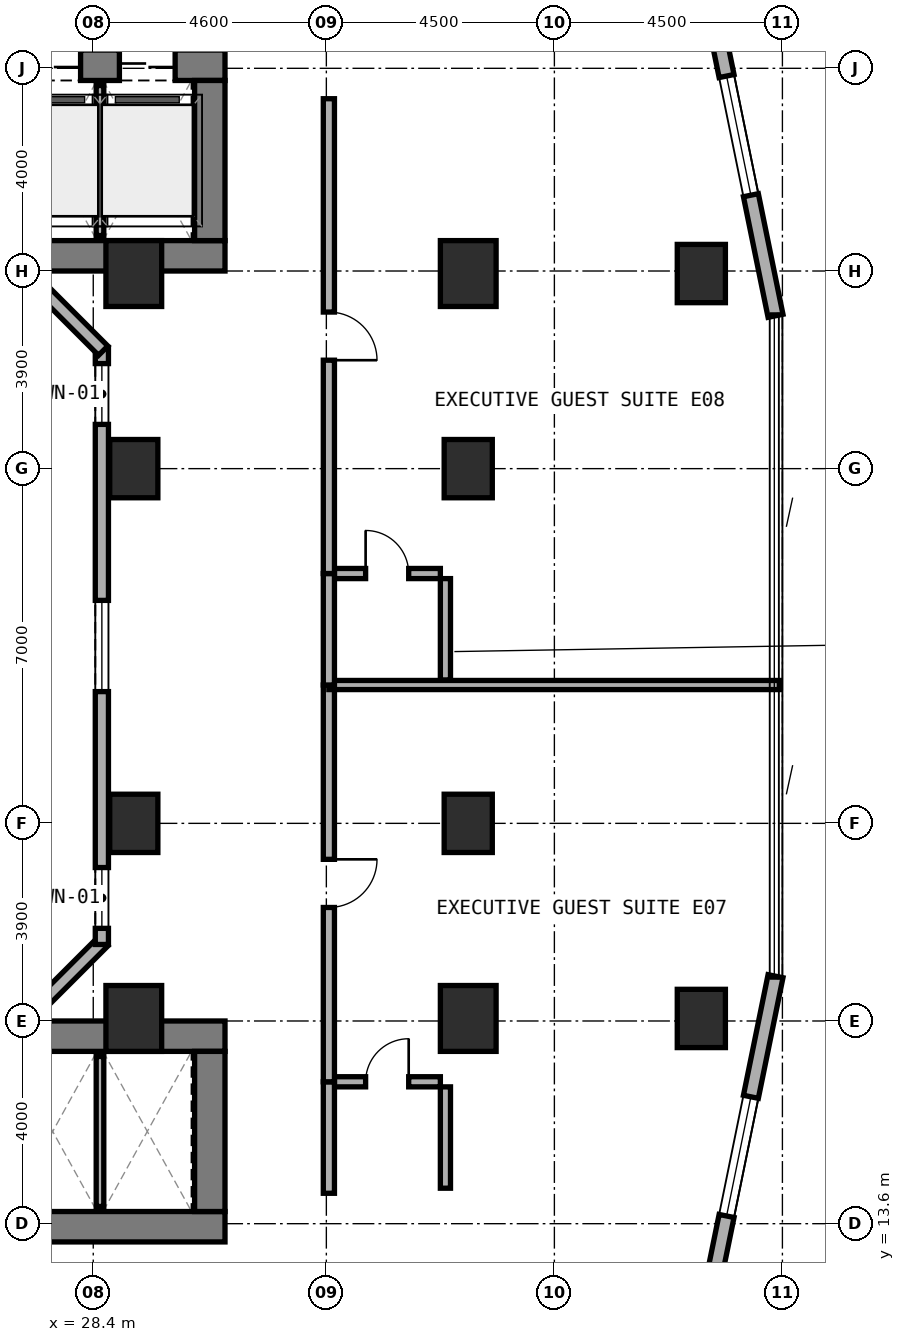
"""IFC4 building model, lengths in metres.
Left out: names, types, materials, properties, quantities, classifications, styles, units other than length and angle.
Written with IfcOpenShell. Run it as: python <this file> out.ifc"""

import sys

from ifc_helpers import new_model, si_unit, direction, frame, frame_2d, origin, origin_2d, place, context, subcontext, project, spatial, rectangle, extrude, element, fill, save


model = new_model("IFC4")
c1 = context("Model", 3, precision=1e-05, world=origin(), true_north=direction((0.0, 1.0)))
c2 = subcontext(c1, "Body", "Model", "MODEL_VIEW")
j1 = project(units=[si_unit("LENGTHUNIT", "METRE"), si_unit("PLANEANGLEUNIT", "RADIAN")], contexts=[c1])
p1 = place(None, origin())
s1 = spatial("IfcSite", under=j1, at=p1, CompositionType="ELEMENT")
p2 = place(p1, origin())
s2 = spatial("IfcBuilding", under=s1, at=p2, CompositionType="ELEMENT")
p3 = place(p2, frame((0.0, 0.0, 45.0)))
s3 = spatial("IfcBuildingStorey", under=s2, at=p3, CompositionType="ELEMENT", Elevation=45.0)
p4 = place(p3, frame((6.2, 32.7, 0.0), z_axis=(0.0, 0.0, 1.0), x_axis=(1.0, 0.0, 0.0)))
e1 = element("IfcWall", 1, at=p4, inside=s3, PredefinedType="SHEAR", context=c2, shape_type="SweptSolid", body=[
    extrude(rectangle(XDim=24.8, YDim=0.6, at=frame_2d((12.4, 0.0))), origin(), (0.0, 0.0, 1.0), 3.5),
])
p5 = place(p4, frame((6.25, 0.0, 0.0)))
e2 = element("IfcOpeningElement", 2, at=p5, cuts=e1, PredefinedType="OPENING", context=c2, shape_type="SweptSolid", body=[
    extrude(rectangle(XDim=1.1, YDim=2.15, at=frame_2d((0.55, 1.075))), frame((0.0, 0.31, 0.0), z_axis=(0.0, -1.0, 0.0), x_axis=(1.0, 0.0, 0.0)), (0.0, 0.0, 1.0), 0.62),
])
p6 = place(p3, frame((6.2, 36.46, 0.0), z_axis=(0.0, 0.0, 1.0), x_axis=(1.0, 0.0, 0.0)))
e3 = element("IfcWall", 3, at=p6, inside=s3, PredefinedType="SHEAR", context=c2, shape_type="SweptSolid", body=[
    extrude(rectangle(XDim=24.8, YDim=0.6, at=frame_2d((12.4, 0.0))), origin(), (0.0, 0.0, 1.0), 3.5),
])
p7 = place(p6, frame((9.35, 0.0, 0.0)))
e4 = element("IfcOpeningElement", 4, at=p7, cuts=e3, PredefinedType="OPENING", context=c2, shape_type="SweptSolid", body=[
    extrude(rectangle(XDim=1.2, YDim=2.15, at=frame_2d((0.6, 1.075))), frame((0.0, 0.31, 0.0), z_axis=(0.0, -1.0, 0.0), x_axis=(1.0, 0.0, 0.0)), (0.0, 0.0, 1.0), 0.62),
])
p8 = place(p6, frame((17.14, 0.0, 0.0)))
e5 = element("IfcOpeningElement", 5, at=p8, cuts=e3, PredefinedType="OPENING", context=c2, shape_type="SweptSolid", body=[
    extrude(rectangle(XDim=0.85, YDim=2.1, at=frame_2d((0.425, 1.05))), frame((0.0, 0.31, 0.0), z_axis=(0.0, -1.0, 0.0), x_axis=(1.0, 0.0, 0.0)), (0.0, 0.0, 1.0), 0.62),
])
p9 = place(p6, frame((18.983, 0.0, 0.0)))
e6 = element("IfcOpeningElement", 6, at=p9, cuts=e3, PredefinedType="OPENING", context=c2, shape_type="SweptSolid", body=[
    extrude(rectangle(XDim=1.1, YDim=2.15, at=frame_2d((0.55, 1.075))), frame((0.0, 0.31, 0.0), z_axis=(0.0, -1.0, 0.0), x_axis=(1.0, 0.0, 0.0)), (0.0, 0.0, 1.0), 0.62),
])
p10 = place(p6, frame((20.85, 0.0, 0.0)))
e7 = element("IfcOpeningElement", 7, at=p10, cuts=e3, PredefinedType="OPENING", context=c2, shape_type="SweptSolid", body=[
    extrude(rectangle(XDim=1.1, YDim=2.15, at=frame_2d((0.55, 1.075))), frame((0.0, 0.31, 0.0), z_axis=(0.0, -1.0, 0.0), x_axis=(1.0, 0.0, 0.0)), (0.0, 0.0, 1.0), 0.62),
])
p11 = place(p6, frame((22.716, 0.0, 0.0)))
e8 = element("IfcOpeningElement", 8, at=p11, cuts=e3, PredefinedType="OPENING", context=c2, shape_type="SweptSolid", body=[
    extrude(rectangle(XDim=1.1, YDim=2.15, at=frame_2d((0.55, 1.075))), frame((0.0, 0.31, 0.0), z_axis=(0.0, -1.0, 0.0), x_axis=(1.0, 0.0, 0.0)), (0.0, 0.0, 1.0), 0.62),
])
p12 = place(p3, frame((30.7, 33.0, 0.0), z_axis=(0.0, 0.0, 1.0), x_axis=(0.0, 1.0, 0.0)))
e9 = element("IfcWall", 9, at=p12, inside=s3, PredefinedType="SHEAR", context=c2, shape_type="SweptSolid", body=[
    extrude(rectangle(XDim=3.16, YDim=0.6, at=frame_2d((1.58, 0.0))), origin(), (0.0, 0.0, 1.0), 3.5),
])
p13 = place(p3, frame((6.2, 13.54, 0.0), z_axis=(0.0, 0.0, 1.0), x_axis=(1.0, 0.0, 0.0)))
e10 = element("IfcWall", 10, at=p13, inside=s3, PredefinedType="SHEAR", context=c2, shape_type="SweptSolid", body=[
    extrude(rectangle(XDim=24.8, YDim=0.6, at=frame_2d((12.4, 0.0))), origin(), (0.0, 0.0, 1.0), 3.5),
])
p14 = place(p13, frame((9.35, 0.0, 0.0)))
e11 = element("IfcOpeningElement", 11, at=p14, cuts=e10, PredefinedType="OPENING", context=c2, shape_type="SweptSolid", body=[
    extrude(rectangle(XDim=1.2, YDim=2.15, at=frame_2d((0.6, 1.075))), frame((0.0, 0.31, 0.0), z_axis=(0.0, -1.0, 0.0), x_axis=(1.0, 0.0, 0.0)), (0.0, 0.0, 1.0), 0.62),
])
p15 = place(p13, frame((17.14, 0.0, 0.0)))
e12 = element("IfcOpeningElement", 12, at=p15, cuts=e10, PredefinedType="OPENING", context=c2, shape_type="SweptSolid", body=[
    extrude(rectangle(XDim=0.85, YDim=2.1, at=frame_2d((0.425, 1.05))), frame((0.0, 0.31, 0.0), z_axis=(0.0, -1.0, 0.0), x_axis=(1.0, 0.0, 0.0)), (0.0, 0.0, 1.0), 0.62),
])
p16 = place(p3, frame((6.2, 17.3, 0.0), z_axis=(0.0, 0.0, 1.0), x_axis=(1.0, 0.0, 0.0)))
e13 = element("IfcWall", 13, at=p16, inside=s3, PredefinedType="SHEAR", context=c2, shape_type="SweptSolid", body=[
    extrude(rectangle(XDim=24.8, YDim=0.6, at=frame_2d((12.4, 0.0))), origin(), (0.0, 0.0, 1.0), 3.5),
])
p17 = place(p3, frame((30.7, 13.84, 0.0), z_axis=(0.0, 0.0, 1.0), x_axis=(0.0, 1.0, 0.0)))
e14 = element("IfcWall", 14, at=p17, inside=s3, PredefinedType="SHEAR", context=c2, shape_type="SweptSolid", body=[
    extrude(rectangle(XDim=3.16, YDim=0.6, at=frame_2d((1.58, 0.0))), origin(), (0.0, 0.0, 1.0), 3.5),
])
for number, where, z_axis, x_axis in (
    (15, (35.8, 21.5, 0.0), (0.0, 0.0, 1.0), (1.0, 0.0, 0.0)),
    (16, (35.8, 28.5, 0.0), (0.0, 0.0, 1.0), (1.0, 0.0, 0.0)),
):
    element("IfcColumn", number, at=place(p3, frame(where, z_axis=z_axis, x_axis=x_axis)), inside=s3, PredefinedType="COLUMN", context=c2, shape_type="SweptSolid", body=[
        extrude(rectangle(XDim=0.95, YDim=1.15, at=origin_2d()), origin(), (0.0, 0.0, 1.0), 3.5),
    ])
for number, where, z_axis, x_axis in (
    (17, (35.8, 17.65, 0.0), (0.0, 0.0, 1.0), (1.0, 0.0, 0.0)),
    (18, (35.8, 32.35, 0.0), (0.0, 0.0, 1.0), (1.0, 0.0, 0.0)),
    (19, (29.2, 17.65, 0.0), (0.0, 0.0, 1.0), (1.0, 0.0, 0.0)),
    (20, (29.2, 32.35, 0.0), (0.0, 0.0, 1.0), (1.0, 0.0, 0.0)),
):
    element("IfcColumn", number, at=place(p3, frame(where, z_axis=z_axis, x_axis=x_axis)), inside=s3, PredefinedType="COLUMN", context=c2, shape_type="SweptSolid", body=[
        extrude(rectangle(XDim=1.1, YDim=1.3, at=origin_2d()), origin(), (0.0, 0.0, 1.0), 3.5),
    ])
for number, where, z_axis, x_axis in (
    (21, (29.2, 21.5, 0.0), (0.0, 0.0, 1.0), (1.0, 0.0, 0.0)),
    (22, (29.2, 28.5, 0.0), (0.0, 0.0, 1.0), (1.0, 0.0, 0.0)),
    (23, (40.4, 17.65, 0.0), (0.0, 0.0, 1.0), (1.0, 0.0, 0.0)),
    (24, (40.4, 32.35, 0.0), (0.0, 0.0, 1.0), (1.0, 0.0, 0.0)),
):
    element("IfcColumn", number, at=place(p3, frame(where, z_axis=z_axis, x_axis=x_axis)), inside=s3, PredefinedType="COLUMN", context=c2, shape_type="SweptSolid", body=[
        extrude(rectangle(XDim=0.95, YDim=1.15, at=origin_2d()), origin(), (0.0, 0.0, 1.0), 3.5),
    ])
p18 = place(p3, frame((39.851, 8.622, 0.0), z_axis=(0.0, 0.0, 1.0), x_axis=(0.199990901713, 0.979797754249, 0.0)))
e25 = element("IfcWall", 25, at=p18, inside=s3, PredefinedType="STANDARD", context=c2, shape_type="SweptSolid", body=[
    extrude(rectangle(XDim=10.065, YDim=0.3, at=frame_2d((5.033, 0.0))), origin(), (0.0, 0.0, 1.0), 3.22),
])
p19 = place(p18, frame((0.378, 0.0, 0.85)))
e26 = element("IfcOpeningElement", 26, at=p19, cuts=e25, PredefinedType="OPENING", context=c2, shape_type="SweptSolid", body=[
    extrude(rectangle(XDim=1.8, YDim=1.5, at=frame_2d((0.9, 0.75))), frame((0.0, 0.16, 0.0), z_axis=(0.0, -1.0, 0.0), x_axis=(1.0, 0.0, 0.0)), (0.0, 0.0, 1.0), 0.32),
])
p20 = place(p18, frame((5.236, 0.0, 0.8)))
e27 = element("IfcOpeningElement", 27, at=p20, cuts=e25, PredefinedType="OPENING", context=c2, shape_type="SweptSolid", body=[
    extrude(rectangle(XDim=2.4, YDim=1.6, at=frame_2d((1.2, 0.8))), frame((0.0, 0.16, 0.0), z_axis=(0.0, -1.0, 0.0), x_axis=(1.0, 0.0, 0.0)), (0.0, 0.0, 1.0), 0.32),
])
p21 = place(p3, frame((41.864, 31.516, 0.0), z_axis=(0.0, 0.0, 1.0), x_axis=(-0.199990901713, 0.979797754249, 0.0)))
e28 = element("IfcWall", 28, at=p21, inside=s3, PredefinedType="STANDARD", context=c2, shape_type="SweptSolid", body=[
    extrude(rectangle(XDim=10.065, YDim=0.3, at=frame_2d((5.033, 0.0))), origin(), (0.0, 0.0, 1.0), 3.22),
])
p22 = place(p21, frame((2.429, 0.0, 0.8)))
e29 = element("IfcOpeningElement", 29, at=p22, cuts=e28, PredefinedType="OPENING", context=c2, shape_type="SweptSolid", body=[
    extrude(rectangle(XDim=2.4, YDim=1.6, at=frame_2d((1.2, 0.8))), frame((0.0, 0.16, 0.0), z_axis=(0.0, -1.0, 0.0), x_axis=(1.0, 0.0, 0.0)), (0.0, 0.0, 1.0), 0.32),
])
p23 = place(p21, frame((7.887, 0.0, 0.85)))
e30 = element("IfcOpeningElement", 30, at=p23, cuts=e28, PredefinedType="OPENING", context=c2, shape_type="SweptSolid", body=[
    extrude(rectangle(XDim=1.8, YDim=1.5, at=frame_2d((0.9, 0.75))), frame((0.0, 0.16, 0.0), z_axis=(0.0, -1.0, 0.0), x_axis=(1.0, 0.0, 0.0)), (0.0, 0.0, 1.0), 0.32),
])
p24 = place(p3, frame((26.762, 17.338, 0.0), z_axis=(0.0, 0.0, 1.0), x_axis=(0.707059717605, 0.707153841636, 0.0)))
e31 = element("IfcWall", 31, at=p24, inside=s3, PredefinedType="STANDARD", context=c2, shape_type="SweptSolid", body=[
    extrude(rectangle(XDim=2.594, YDim=0.26, at=frame_2d((1.297, 0.0))), origin(), (0.0, 0.0, 1.0), 3.22),
])
p25 = place(p3, frame((28.57, 19.11, 0.0), z_axis=(0.0, 0.0, 1.0), x_axis=(0.0, 1.0, 0.0)))
e32 = element("IfcWall", 32, at=p25, inside=s3, PredefinedType="STANDARD", context=c2, shape_type="SweptSolid", body=[
    extrude(rectangle(XDim=11.78, YDim=0.26, at=frame_2d((5.89, 0.0))), origin(), (0.0, 0.0, 1.0), 3.22),
])
p26 = place(p25, frame((0.318, 0.0, 0.85)))
e33 = element("IfcOpeningElement", 33, at=p26, cuts=e32, PredefinedType="OPENING", context=c2, shape_type="SweptSolid", body=[
    extrude(rectangle(XDim=1.2, YDim=1.5, at=frame_2d((0.6, 0.75))), frame((0.0, 0.14, 0.0), z_axis=(0.0, -1.0, 0.0), x_axis=(1.0, 0.0, 0.0)), (0.0, 0.0, 1.0), 0.28),
])
p27 = place(p25, frame((4.99, 0.0, 0.85)))
e34 = element("IfcOpeningElement", 34, at=p27, cuts=e32, PredefinedType="OPENING", context=c2, shape_type="SweptSolid", body=[
    extrude(rectangle(XDim=1.8, YDim=1.5, at=frame_2d((0.9, 0.75))), frame((0.0, 0.14, 0.0), z_axis=(0.0, -1.0, 0.0), x_axis=(1.0, 0.0, 0.0)), (0.0, 0.0, 1.0), 0.28),
])
p28 = place(p25, frame((10.263, 0.0, 0.85)))
e35 = element("IfcOpeningElement", 35, at=p28, cuts=e32, PredefinedType="OPENING", context=c2, shape_type="SweptSolid", body=[
    extrude(rectangle(XDim=1.2, YDim=1.5, at=frame_2d((0.6, 0.75))), frame((0.0, 0.14, 0.0), z_axis=(0.0, -1.0, 0.0), x_axis=(1.0, 0.0, 0.0)), (0.0, 0.0, 1.0), 0.28),
])
p29 = place(p3, frame((28.596, 30.828, 0.0), z_axis=(0.0, 0.0, 1.0), x_axis=(-0.707059717605, 0.707153841636, 0.0)))
e36 = element("IfcWall", 36, at=p29, inside=s3, PredefinedType="STANDARD", context=c2, shape_type="SweptSolid", body=[
    extrude(rectangle(XDim=2.594, YDim=0.26, at=frame_2d((1.297, 0.0))), origin(), (0.0, 0.0, 1.0), 3.22),
])
for number, where, z_axis, x_axis in (
    (37, (28.533, 33.1, 0.0), (0.0, 0.0, 1.0), (0.0, 1.0, 0.0)),
    (38, (28.533, 13.94, 0.0), (0.0, 0.0, 1.0), (0.0, 1.0, 0.0)),
):
    element("IfcWall", number, at=place(p3, frame(where, z_axis=z_axis, x_axis=x_axis)), inside=s3, PredefinedType="PARTITIONING", context=c2, shape_type="SweptSolid", body=[
        extrude(rectangle(XDim=2.96, YDim=0.15, at=frame_2d((1.48, 0.0))), origin(), (0.0, 0.0, 1.0), 2.395),
    ])
p30 = place(p3, frame((33.15, 16.4, 0.0), z_axis=(0.0, 0.0, 1.0), x_axis=(1.0, 0.0, 0.0)))
e39 = element("IfcWall", 39, at=p30, inside=s3, PredefinedType="PLUMBINGWALL", context=c2, shape_type="SweptSolid", body=[
    extrude(rectangle(XDim=2.1, YDim=0.2, at=frame_2d((1.05, 0.0))), origin(), (0.0, 0.0, 1.0), 3.22),
])
p31 = place(p30, frame((0.625, 0.0, 0.0)))
e40 = element("IfcOpeningElement", 40, at=p31, cuts=e39, PredefinedType="OPENING", context=c2, shape_type="SweptSolid", body=[
    extrude(rectangle(XDim=0.85, YDim=2.1, at=frame_2d((0.425, 1.05))), frame((0.0, 0.11, 0.0), z_axis=(0.0, -1.0, 0.0), x_axis=(1.0, 0.0, 0.0)), (0.0, 0.0, 1.0), 0.22),
])
p32 = place(p3, frame((35.35, 14.3, 0.0), z_axis=(0.0, 0.0, 1.0), x_axis=(0.0, 1.0, 0.0)))
e41 = element("IfcWall", 41, at=p32, inside=s3, PredefinedType="PLUMBINGWALL", context=c2, shape_type="SweptSolid", body=[
    extrude(rectangle(XDim=2.0, YDim=0.2, at=frame_2d((1.0, 0.0))), origin(), (0.0, 0.0, 1.0), 2.745),
])
p33 = place(p3, frame((33.05, 14.2, 0.0), z_axis=(0.0, 0.0, 1.0), x_axis=(0.0, 1.0, 0.0)))
e42 = element("IfcWall", 42, at=p33, inside=s3, PredefinedType="SOLIDWALL", context=c2, shape_type="SweptSolid", body=[
    extrude(rectangle(XDim=2.2, YDim=0.22, at=frame_2d((1.1, 0.0))), origin(), (0.0, 0.0, 1.0), 3.22),
])
p34 = place(p3, frame((33.05, 16.4, 0.0), z_axis=(0.0, 0.0, 1.0), x_axis=(0.0, 1.0, 0.0)))
e43 = element("IfcWall", 43, at=p34, inside=s3, PredefinedType="SOLIDWALL", context=c2, shape_type="SweptSolid", body=[
    extrude(rectangle(XDim=7.83, YDim=0.22, at=frame_2d((3.915, 0.0))), origin(), (0.0, 0.0, 1.0), 2.395),
])
p35 = place(p34, frame((3.44, 0.0, 0.0)))
e44 = element("IfcOpeningElement", 44, at=p35, cuts=e43, PredefinedType="OPENING", context=c2, shape_type="SweptSolid", body=[
    extrude(rectangle(XDim=0.95, YDim=2.1, at=frame_2d((0.475, 1.05))), frame((0.0, 0.12, 0.0), z_axis=(0.0, -1.0, 0.0), x_axis=(1.0, 0.0, 0.0)), (0.0, 0.0, 1.0), 0.24),
])
p36 = place(p3, frame((33.05, 24.23, 0.0), z_axis=(0.0, 0.0, 1.0), x_axis=(1.0, 0.0, 0.0)))
e45 = element("IfcWall", 45, at=p36, inside=s3, PredefinedType="SOLIDWALL", context=c2, shape_type="SweptSolid", body=[
    extrude(rectangle(XDim=8.89, YDim=0.18, at=frame_2d((4.445, 0.0))), origin(), (0.0, 0.0, 1.0), 2.745),
])
p37 = place(p3, frame((33.15, 26.43, 0.0), z_axis=(0.0, 0.0, 1.0), x_axis=(1.0, 0.0, 0.0)))
e46 = element("IfcWall", 46, at=p37, inside=s3, PredefinedType="PLUMBINGWALL", context=c2, shape_type="SweptSolid", body=[
    extrude(rectangle(XDim=2.1, YDim=0.2, at=frame_2d((1.05, 0.0))), origin(), (0.0, 0.0, 1.0), 3.22),
])
p38 = place(p37, frame((0.625, 0.0, 0.0)))
e47 = element("IfcOpeningElement", 47, at=p38, cuts=e46, PredefinedType="OPENING", context=c2, shape_type="SweptSolid", body=[
    extrude(rectangle(XDim=0.85, YDim=2.1, at=frame_2d((0.425, 1.05))), frame((0.0, 0.11, 0.0), z_axis=(0.0, -1.0, 0.0), x_axis=(1.0, 0.0, 0.0)), (0.0, 0.0, 1.0), 0.22),
])
p39 = place(p3, frame((35.35, 24.33, 0.0), z_axis=(0.0, 0.0, 1.0), x_axis=(0.0, 1.0, 0.0)))
e48 = element("IfcWall", 48, at=p39, inside=s3, PredefinedType="PLUMBINGWALL", context=c2, shape_type="SweptSolid", body=[
    extrude(rectangle(XDim=2.0, YDim=0.2, at=frame_2d((1.0, 0.0))), origin(), (0.0, 0.0, 1.0), 3.22),
])
p40 = place(p3, frame((33.05, 24.23, 0.0), z_axis=(0.0, 0.0, 1.0), x_axis=(0.0, 1.0, 0.0)))
e49 = element("IfcWall", 49, at=p40, inside=s3, PredefinedType="SOLIDWALL", context=c2, shape_type="SweptSolid", body=[
    extrude(rectangle(XDim=2.2, YDim=0.22, at=frame_2d((1.1, 0.0))), origin(), (0.0, 0.0, 1.0), 3.22),
])
p41 = place(p3, frame((33.05, 26.43, 0.0), z_axis=(0.0, 0.0, 1.0), x_axis=(0.0, 1.0, 0.0)))
e50 = element("IfcWall", 50, at=p41, inside=s3, PredefinedType="SOLIDWALL", context=c2, shape_type="SweptSolid", body=[
    extrude(rectangle(XDim=9.37, YDim=0.22, at=frame_2d((4.685, 0.0))), origin(), (0.0, 0.0, 1.0), 2.395),
])
p42 = place(p41, frame((4.21, 0.0, 0.0)))
e51 = element("IfcOpeningElement", 51, at=p42, cuts=e50, PredefinedType="OPENING", context=c2, shape_type="SweptSolid", body=[
    extrude(rectangle(XDim=0.95, YDim=2.1, at=frame_2d((0.475, 1.05))), frame((0.0, 0.12, 0.0), z_axis=(0.0, -1.0, 0.0), x_axis=(1.0, 0.0, 0.0)), (0.0, 0.0, 1.0), 0.24),
])
p43 = place(p20, origin())
e52 = element("IfcWindow", 52, at=p43, inside=s3, PartitioningType="SINGLE_PANEL", PredefinedType="WINDOW", context=c2, shape_type="SweptSolid", body=[
    extrude(rectangle(XDim=2.4, YDim=1.6, at=frame_2d((1.2, 0.8))), frame((0.0, 0.03, 0.0), z_axis=(0.0, -1.0, 0.0), x_axis=(1.0, 0.0, 0.0)), (0.0, 0.0, 1.0), 0.06),
])
fill(e27, e52)
p44 = place(p22, origin())
e53 = element("IfcWindow", 53, at=p44, inside=s3, PartitioningType="SINGLE_PANEL", PredefinedType="WINDOW", context=c2, shape_type="SweptSolid", body=[
    extrude(rectangle(XDim=2.4, YDim=1.6, at=frame_2d((1.2, 0.8))), frame((0.0, 0.03, 0.0), z_axis=(0.0, -1.0, 0.0), x_axis=(1.0, 0.0, 0.0)), (0.0, 0.0, 1.0), 0.06),
])
fill(e29, e53)
p45 = place(p26, origin())
e54 = element("IfcWindow", 54, at=p45, inside=s3, PartitioningType="SINGLE_PANEL", PredefinedType="WINDOW", context=c2, shape_type="SweptSolid", body=[
    extrude(rectangle(XDim=1.2, YDim=1.5, at=frame_2d((0.6, 0.75))), frame((0.0, 0.03, 0.0), z_axis=(0.0, -1.0, 0.0), x_axis=(1.0, 0.0, 0.0)), (0.0, 0.0, 1.0), 0.06),
])
fill(e33, e54)
p46 = place(p27, origin())
e55 = element("IfcWindow", 55, at=p46, inside=s3, PartitioningType="SINGLE_PANEL", PredefinedType="WINDOW", context=c2, shape_type="SweptSolid", body=[
    extrude(rectangle(XDim=1.8, YDim=1.5, at=frame_2d((0.9, 0.75))), frame((0.0, 0.03, 0.0), z_axis=(0.0, -1.0, 0.0), x_axis=(1.0, 0.0, 0.0)), (0.0, 0.0, 1.0), 0.06),
])
fill(e34, e55)
p47 = place(p28, origin())
e56 = element("IfcWindow", 56, at=p47, inside=s3, PartitioningType="SINGLE_PANEL", PredefinedType="WINDOW", context=c2, shape_type="SweptSolid", body=[
    extrude(rectangle(XDim=1.2, YDim=1.5, at=frame_2d((0.6, 0.75))), frame((0.0, 0.03, 0.0), z_axis=(0.0, -1.0, 0.0), x_axis=(1.0, 0.0, 0.0)), (0.0, 0.0, 1.0), 0.06),
])
fill(e35, e56)
p48 = place(p10, origin())
e57 = element("IfcDoor", 57, at=p48, inside=s3, OperationType="DOUBLE_DOOR_SLIDING", PredefinedType="DOOR", context=c2, shape_type="SweptSolid", body=[
    extrude(rectangle(XDim=1.1, YDim=2.15, at=frame_2d((0.55, 1.075))), frame((0.0, 0.025, 0.0), z_axis=(0.0, -1.0, 0.0), x_axis=(1.0, 0.0, 0.0)), (0.0, 0.0, 1.0), 0.05),
])
fill(e7, e57)
p49 = place(p11, origin())
e58 = element("IfcDoor", 58, at=p49, inside=s3, OperationType="DOUBLE_DOOR_SLIDING", PredefinedType="DOOR", context=c2, shape_type="SweptSolid", body=[
    extrude(rectangle(XDim=1.1, YDim=2.15, at=frame_2d((0.55, 1.075))), frame((0.0, 0.025, 0.0), z_axis=(0.0, -1.0, 0.0), x_axis=(1.0, 0.0, 0.0)), (0.0, 0.0, 1.0), 0.05),
])
fill(e8, e58)
p50 = place(p31, origin())
e59 = element("IfcDoor", 59, at=p50, inside=s3, OperationType="SINGLE_SWING_RIGHT", PredefinedType="DOOR", context=c2, shape_type="SweptSolid", body=[
    extrude(rectangle(XDim=0.85, YDim=2.1, at=frame_2d((0.425, 1.05))), frame((0.0, 0.025, 0.0), z_axis=(0.0, -1.0, 0.0), x_axis=(1.0, 0.0, 0.0)), (0.0, 0.0, 1.0), 0.05),
])
fill(e40, e59)
p51 = place(p35, frame((0.95, 0.0, 0.0), z_axis=(0.0, 0.0, 1.0), x_axis=(-1.0, 0.0, 0.0)))
e60 = element("IfcDoor", 60, at=p51, inside=s3, OperationType="SINGLE_SWING_LEFT", PredefinedType="DOOR", context=c2, shape_type="SweptSolid", body=[
    extrude(rectangle(XDim=0.95, YDim=2.1, at=frame_2d((0.475, 1.05))), frame((0.0, 0.025, 0.0), z_axis=(0.0, -1.0, 0.0), x_axis=(1.0, 0.0, 0.0)), (0.0, 0.0, 1.0), 0.05),
])
fill(e44, e60)
p52 = place(p38, origin())
e61 = element("IfcDoor", 61, at=p52, inside=s3, OperationType="SINGLE_SWING_LEFT", PredefinedType="DOOR", context=c2, shape_type="SweptSolid", body=[
    extrude(rectangle(XDim=0.85, YDim=2.1, at=frame_2d((0.425, 1.05))), frame((0.0, 0.025, 0.0), z_axis=(0.0, -1.0, 0.0), x_axis=(1.0, 0.0, 0.0)), (0.0, 0.0, 1.0), 0.05),
])
fill(e47, e61)
p53 = place(p42, frame((0.95, 0.0, 0.0), z_axis=(0.0, 0.0, 1.0), x_axis=(-1.0, 0.0, 0.0)))
e62 = element("IfcDoor", 62, at=p53, inside=s3, OperationType="SINGLE_SWING_RIGHT", PredefinedType="DOOR", context=c2, shape_type="SweptSolid", body=[
    extrude(rectangle(XDim=0.95, YDim=2.1, at=frame_2d((0.475, 1.05))), frame((0.0, 0.025, 0.0), z_axis=(0.0, -1.0, 0.0), x_axis=(1.0, 0.0, 0.0)), (0.0, 0.0, 1.0), 0.05),
])
fill(e51, e62)
save(model, sys.argv[1])
